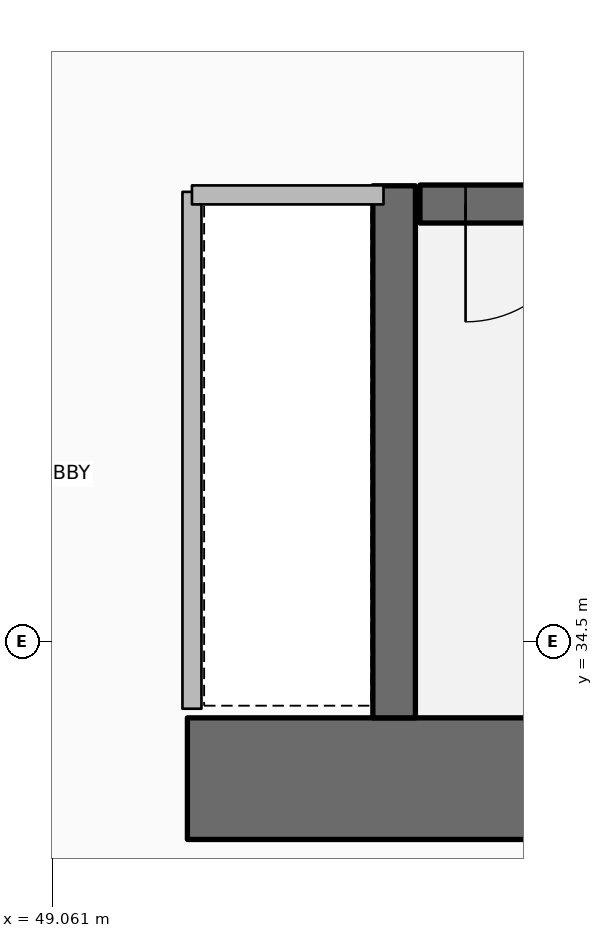
"""IFC4 building model, lengths in metres.
Left out: names, types, materials, properties, quantities, classifications, styles, units other than length and angle.
Written with IfcOpenShell. Run it as: python <this file> out.ifc"""

import sys

from ifc_helpers import new_model, si_unit, direction, frame, frame_2d, origin, place, context, subcontext, project, spatial, rectangle, extrude, element, fill, save


model = new_model("IFC4")
c1 = context("Model", 3, precision=1e-05, world=origin(), true_north=direction((0.0, 1.0)))
c2 = subcontext(c1, "Body", "Model", "MODEL_VIEW")
j1 = project(units=[si_unit("LENGTHUNIT", "METRE"), si_unit("PLANEANGLEUNIT", "RADIAN")], contexts=[c1])
p1 = place(None, origin())
s1 = spatial("IfcSite", under=j1, at=p1, CompositionType="ELEMENT")
p2 = place(p1, origin())
s2 = spatial("IfcBuilding", under=s1, at=p2, CompositionType="ELEMENT")
p3 = place(p2, frame((0.0, 0.0, 116.4)))
s3 = spatial("IfcBuildingStorey", under=s2, at=p3, CompositionType="ELEMENT", Elevation=116.4)
p4 = place(p3, frame((49.95, 33.6, 0.0), z_axis=(0.0, 0.0, 1.0), x_axis=(1.0, 0.0, 0.0)))
e1 = element("IfcWall", 1, at=p4, inside=s3, PredefinedType="SHEAR", context=c2, shape_type="SweptSolid", body=[
    extrude(rectangle(XDim=9.9, YDim=0.8, at=frame_2d((4.95, 0.0))), origin(), (0.0, 0.0, 1.0), 6.6),
])
p5 = place(p3, frame((51.31, 34.0, 0.0), z_axis=(0.0, 0.0, 1.0), x_axis=(0.0, 1.0, 0.0)))
e2 = element("IfcWall", 2, at=p5, inside=s3, PredefinedType="SHEAR", context=c2, shape_type="SweptSolid", body=[
    extrude(rectangle(XDim=3.5, YDim=0.28, at=frame_2d((1.75, 0.0))), origin(), (0.0, 0.0, 1.0), 6.6),
])
p6 = place(p3, frame((51.48, 37.38, 0.0), z_axis=(0.0, 0.0, 1.0), x_axis=(1.0, 0.0, 0.0)))
e3 = element("IfcWall", 3, at=p6, inside=s3, PredefinedType="SOLIDWALL", context=c2, shape_type="SweptSolid", body=[
    extrude(rectangle(XDim=7.54, YDim=0.25, at=frame_2d((3.77, 0.0))), origin(), (0.0, 0.0, 1.0), 6.28),
])
p7 = place(p6, frame((0.3, 0.0, 0.0)))
e4 = element("IfcOpeningElement", 4, at=p7, cuts=e3, PredefinedType="OPENING", context=c2, shape_type="SweptSolid", body=[
    extrude(rectangle(XDim=1.55, YDim=2.15, at=frame_2d((0.775, 1.075))), frame((0.0, 0.135, 0.0), z_axis=(0.0, -1.0, 0.0), x_axis=(1.0, 0.0, 0.0)), (0.0, 0.0, 1.0), 0.27),
])
p8 = place(p3, frame((49.98, 34.06, 0.0), z_axis=(0.0, 0.0, 1.0), x_axis=(0.0, 1.0, 0.0)))
e5 = element("IfcWall", 5, at=p8, inside=s3, PredefinedType="PARTITIONING", context=c2, shape_type="SweptSolid", body=[
    extrude(rectangle(XDim=3.4, YDim=0.125, at=frame_2d((1.7, 0.0))), origin(), (0.0, 0.0, 1.0), 5.72),
])
p9 = place(p3, frame((49.98, 37.44, 0.0), z_axis=(0.0, 0.0, 1.0), x_axis=(1.0, 0.0, 0.0)))
e6 = element("IfcWall", 6, at=p9, inside=s3, PredefinedType="PARTITIONING", context=c2, shape_type="SweptSolid", body=[
    extrude(rectangle(XDim=1.26, YDim=0.125, at=frame_2d((0.63, 0.0))), origin(), (0.0, 0.0, 1.0), 5.72),
])
p10 = place(p7, origin())
e7 = element("IfcDoor", 7, at=p10, inside=s3, OperationType="DOUBLE_DOOR_SINGLE_SWING", PredefinedType="DOOR", context=c2, shape_type="SweptSolid", body=[
    extrude(rectangle(XDim=1.55, YDim=2.15, at=frame_2d((0.775, 1.075))), frame((0.0, 0.025, 0.0), z_axis=(0.0, -1.0, 0.0), x_axis=(1.0, 0.0, 0.0)), (0.0, 0.0, 1.0), 0.05),
])
fill(e4, e7)
save(model, sys.argv[1])
